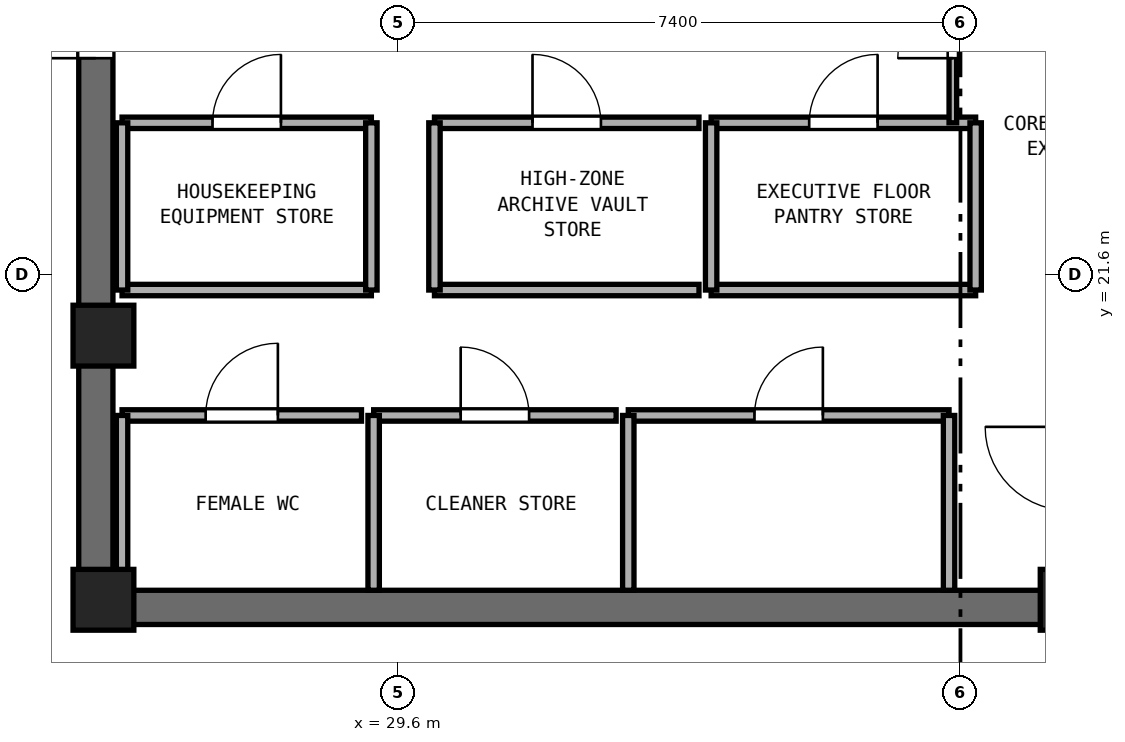
"""IFC4 building model, lengths in metres.
Left out: names, types, materials, properties, quantities, classifications, styles, units other than length and angle.
Written with IfcOpenShell. Run it as: python <this file> out.ifc"""

import sys

from ifc_helpers import new_model, si_unit, direction, frame, frame_2d, origin, origin_2d, place, context, subcontext, project, spatial, rectangle, extrude, element, fill, save


model = new_model("IFC4")
c1 = context("Model", 3, precision=1e-05, world=origin(), true_north=direction((0.0, 1.0)))
c2 = subcontext(c1, "Body", "Model", "MODEL_VIEW")
j1 = project(units=[si_unit("LENGTHUNIT", "METRE"), si_unit("PLANEANGLEUNIT", "RADIAN")], contexts=[c1])
p1 = place(None, origin())
s1 = spatial("IfcSite", under=j1, at=p1, CompositionType="ELEMENT")
p2 = place(p1, origin())
s2 = spatial("IfcBuilding", under=s1, at=p2, CompositionType="ELEMENT")
p3 = place(p2, frame((0.0, 0.0, 289.6)))
s3 = spatial("IfcBuildingStorey", under=s2, at=p3, CompositionType="ELEMENT", Elevation=289.6)
p4 = place(p3, frame((25.4, 17.225, 0.0), z_axis=(0.0, 0.0, 1.0), x_axis=(1.0, 0.0, 0.0)))
e1 = element("IfcWall", 1, at=p4, inside=s3, PredefinedType="SHEAR", context=c2, shape_type="SweptSolid", body=[
    extrude(rectangle(XDim=23.2, YDim=0.45, at=frame_2d((11.6, 0.0))), origin(), (0.0, 0.0, 1.0), 3.54),
])
p5 = place(p3, frame((25.625, 17.45, 0.0), z_axis=(0.0, 0.0, 1.0), x_axis=(0.0, 1.0, 0.0)))
e2 = element("IfcWall", 2, at=p5, inside=s3, PredefinedType="SHEAR", context=c2, shape_type="SweptSolid", body=[
    extrude(rectangle(XDim=15.5, YDim=0.45, at=frame_2d((7.75, 0.0))), origin(), (0.0, 0.0, 1.0), 3.54),
])
p6 = place(p5, frame((7.0, 0.0, 0.0)))
e3 = element("IfcOpeningElement", 3, at=p6, cuts=e2, PredefinedType="OPENING", context=c2, shape_type="SweptSolid", body=[
    extrude(rectangle(XDim=1.5, YDim=2.15, at=frame_2d((0.75, 1.075))), frame((0.0, 0.235, 0.0), z_axis=(0.0, -1.0, 0.0), x_axis=(1.0, 0.0, 0.0)), (0.0, 0.0, 1.0), 0.47),
])
for number, where, z_axis, x_axis in (
    (4, (25.725, 17.325, 0.0), (0.0, 0.0, 1.0), (1.0, 0.0, 0.0)),
    (5, (38.45, 17.325, 0.0), (0.0, 0.0, 1.0), (1.0, 0.0, 0.0)),
    (6, (25.725, 20.8, 0.0), (0.0, 0.0, 1.0), (1.0, 0.0, 0.0)),
):
    element("IfcColumn", number, at=place(p3, frame(where, z_axis=z_axis, x_axis=x_axis)), inside=s3, PredefinedType="PILASTER", context=c2, shape_type="SweptSolid", body=[
        extrude(rectangle(XDim=0.8, YDim=0.8, at=origin_2d()), origin(), (0.0, 0.0, 1.0), 3.8),
    ])
p7 = place(p3, frame((25.97, 19.75, 0.0), z_axis=(0.0, 0.0, 1.0), x_axis=(1.0, 0.0, 0.0)))
e7 = element("IfcWall", 7, at=p7, inside=s3, PredefinedType="PARTITIONING", context=c2, shape_type="SweptSolid", body=[
    extrude(rectangle(XDim=3.15, YDim=0.15, at=frame_2d((1.575, 0.0))), origin(), (0.0, 0.0, 1.0), 3.54),
])
p8 = place(p7, frame((1.1, 0.0, 0.0)))
e8 = element("IfcOpeningElement", 8, at=p8, cuts=e7, PredefinedType="OPENING", context=c2, shape_type="SweptSolid", body=[
    extrude(rectangle(XDim=0.95, YDim=2.1, at=frame_2d((0.475, 1.05))), frame((0.0, 0.085, 0.0), z_axis=(0.0, -1.0, 0.0), x_axis=(1.0, 0.0, 0.0)), (0.0, 0.0, 1.0), 0.17),
])
p9 = place(p3, frame((25.97, 17.45, 0.0), z_axis=(0.0, 0.0, 1.0), x_axis=(0.0, 1.0, 0.0)))
e9 = element("IfcWall", 9, at=p9, inside=s3, PredefinedType="PARTITIONING", context=c2, shape_type="SweptSolid", body=[
    extrude(rectangle(XDim=2.3, YDim=0.15, at=frame_2d((1.15, 0.0))), origin(), (0.0, 0.0, 1.0), 2.64),
])
p10 = place(p3, frame((29.28, 19.75, 0.0), z_axis=(0.0, 0.0, 1.0), x_axis=(1.0, 0.0, 0.0)))
e10 = element("IfcWall", 10, at=p10, inside=s3, PredefinedType="PARTITIONING", context=c2, shape_type="SweptSolid", body=[
    extrude(rectangle(XDim=3.19, YDim=0.15, at=frame_2d((1.595, 0.0))), origin(), (0.0, 0.0, 1.0), 3.54),
])
p11 = place(p10, frame((1.145, 0.0, 0.0)))
e11 = element("IfcOpeningElement", 11, at=p11, cuts=e10, PredefinedType="OPENING", context=c2, shape_type="SweptSolid", body=[
    extrude(rectangle(XDim=0.9, YDim=2.1, at=frame_2d((0.45, 1.05))), frame((0.0, 0.085, 0.0), z_axis=(0.0, -1.0, 0.0), x_axis=(1.0, 0.0, 0.0)), (0.0, 0.0, 1.0), 0.17),
])
p12 = place(p3, frame((29.28, 17.45, 0.0), z_axis=(0.0, 0.0, 1.0), x_axis=(0.0, 1.0, 0.0)))
e12 = element("IfcWall", 12, at=p12, inside=s3, PredefinedType="PARTITIONING", context=c2, shape_type="SweptSolid", body=[
    extrude(rectangle(XDim=2.3, YDim=0.15, at=frame_2d((1.15, 0.0))), origin(), (0.0, 0.0, 1.0), 3.54),
])
p13 = place(p3, frame((32.63, 19.75, 0.0), z_axis=(0.0, 0.0, 1.0), x_axis=(1.0, 0.0, 0.0)))
e13 = element("IfcWall", 13, at=p13, inside=s3, PredefinedType="PARTITIONING", context=c2, shape_type="SweptSolid", body=[
    extrude(rectangle(XDim=4.22, YDim=0.15, at=frame_2d((2.11, 0.0))), origin(), (0.0, 0.0, 1.0), 3.54),
])
p14 = place(p13, frame((1.66, 0.0, 0.0)))
e14 = element("IfcOpeningElement", 14, at=p14, cuts=e13, PredefinedType="OPENING", context=c2, shape_type="SweptSolid", body=[
    extrude(rectangle(XDim=0.9, YDim=2.1, at=frame_2d((0.45, 1.05))), frame((0.0, 0.085, 0.0), z_axis=(0.0, -1.0, 0.0), x_axis=(1.0, 0.0, 0.0)), (0.0, 0.0, 1.0), 0.17),
])
for number, where, z_axis, x_axis in (
    (15, (32.63, 17.45, 0.0), (0.0, 0.0, 1.0), (0.0, 1.0, 0.0)),
    (16, (36.85, 17.45, 0.0), (0.0, 0.0, 1.0), (0.0, 1.0, 0.0)),
):
    element("IfcWall", number, at=place(p3, frame(where, z_axis=z_axis, x_axis=x_axis)), inside=s3, PredefinedType="PARTITIONING", context=c2, shape_type="SweptSolid", body=[
        extrude(rectangle(XDim=2.3, YDim=0.15, at=frame_2d((1.15, 0.0))), origin(), (0.0, 0.0, 1.0), 3.54),
    ])
p15 = place(p3, frame((25.97, 21.4, 0.0), z_axis=(0.0, 0.0, 1.0), x_axis=(1.0, 0.0, 0.0)))
e17 = element("IfcWall", 17, at=p15, inside=s3, PredefinedType="PARTITIONING", context=c2, shape_type="SweptSolid", body=[
    extrude(rectangle(XDim=3.28, YDim=0.15, at=frame_2d((1.64, 0.0))), origin(), (0.0, 0.0, 1.0), 3.54),
])
p16 = place(p3, frame((25.97, 23.6, 0.0), z_axis=(0.0, 0.0, 1.0), x_axis=(1.0, 0.0, 0.0)))
e18 = element("IfcWall", 18, at=p16, inside=s3, PredefinedType="PARTITIONING", context=c2, shape_type="SweptSolid", body=[
    extrude(rectangle(XDim=3.28, YDim=0.15, at=frame_2d((1.64, 0.0))), origin(), (0.0, 0.0, 1.0), 3.54),
])
p17 = place(p16, frame((1.19, 0.0, 0.0)))
e19 = element("IfcOpeningElement", 19, at=p17, cuts=e18, PredefinedType="OPENING", context=c2, shape_type="SweptSolid", body=[
    extrude(rectangle(XDim=0.9, YDim=2.1, at=frame_2d((0.45, 1.05))), frame((0.0, 0.085, 0.0), z_axis=(0.0, -1.0, 0.0), x_axis=(1.0, 0.0, 0.0)), (0.0, 0.0, 1.0), 0.17),
])
p18 = place(p3, frame((25.97, 21.4, 0.0), z_axis=(0.0, 0.0, 1.0), x_axis=(0.0, 1.0, 0.0)))
e20 = element("IfcWall", 20, at=p18, inside=s3, PredefinedType="PARTITIONING", context=c2, shape_type="SweptSolid", body=[
    extrude(rectangle(XDim=2.2, YDim=0.15, at=frame_2d((1.1, 0.0))), origin(), (0.0, 0.0, 1.0), 2.64),
])
p19 = place(p3, frame((29.25, 21.4, 0.0), z_axis=(0.0, 0.0, 1.0), x_axis=(0.0, 1.0, 0.0)))
e21 = element("IfcWall", 21, at=p19, inside=s3, PredefinedType="PARTITIONING", context=c2, shape_type="SweptSolid", body=[
    extrude(rectangle(XDim=2.2, YDim=0.15, at=frame_2d((1.1, 0.0))), origin(), (0.0, 0.0, 1.0), 3.54),
])
p20 = place(p3, frame((30.08, 21.4, 0.0), z_axis=(0.0, 0.0, 1.0), x_axis=(1.0, 0.0, 0.0)))
e22 = element("IfcWall", 22, at=p20, inside=s3, PredefinedType="PARTITIONING", context=c2, shape_type="SweptSolid", body=[
    extrude(rectangle(XDim=3.48, YDim=0.15, at=frame_2d((1.74, 0.0))), origin(), (0.0, 0.0, 1.0), 3.54),
])
p21 = place(p3, frame((30.08, 23.6, 0.0), z_axis=(0.0, 0.0, 1.0), x_axis=(1.0, 0.0, 0.0)))
e23 = element("IfcWall", 23, at=p21, inside=s3, PredefinedType="PARTITIONING", context=c2, shape_type="SweptSolid", body=[
    extrude(rectangle(XDim=3.48, YDim=0.15, at=frame_2d((1.74, 0.0))), origin(), (0.0, 0.0, 1.0), 3.54),
])
p22 = place(p21, frame((1.29, 0.0, 0.0)))
e24 = element("IfcOpeningElement", 24, at=p22, cuts=e23, PredefinedType="OPENING", context=c2, shape_type="SweptSolid", body=[
    extrude(rectangle(XDim=0.9, YDim=2.1, at=frame_2d((0.45, 1.05))), frame((0.0, 0.085, 0.0), z_axis=(0.0, -1.0, 0.0), x_axis=(1.0, 0.0, 0.0)), (0.0, 0.0, 1.0), 0.17),
])
p23 = place(p3, frame((30.08, 21.4, 0.0), z_axis=(0.0, 0.0, 1.0), x_axis=(0.0, 1.0, 0.0)))
e25 = element("IfcWall", 25, at=p23, inside=s3, PredefinedType="PARTITIONING", context=c2, shape_type="SweptSolid", body=[
    extrude(rectangle(XDim=2.2, YDim=0.15, at=frame_2d((1.1, 0.0))), origin(), (0.0, 0.0, 1.0), 3.54),
])
p24 = place(p3, frame((33.72, 21.4, 0.0), z_axis=(0.0, 0.0, 1.0), x_axis=(1.0, 0.0, 0.0)))
e26 = element("IfcWall", 26, at=p24, inside=s3, PredefinedType="PARTITIONING", context=c2, shape_type="SweptSolid", body=[
    extrude(rectangle(XDim=3.48, YDim=0.15, at=frame_2d((1.74, 0.0))), origin(), (0.0, 0.0, 1.0), 3.54),
])
p25 = place(p3, frame((33.72, 23.6, 0.0), z_axis=(0.0, 0.0, 1.0), x_axis=(1.0, 0.0, 0.0)))
e27 = element("IfcWall", 27, at=p25, inside=s3, PredefinedType="PARTITIONING", context=c2, shape_type="SweptSolid", body=[
    extrude(rectangle(XDim=3.48, YDim=0.15, at=frame_2d((1.74, 0.0))), origin(), (0.0, 0.0, 1.0), 3.54),
])
p26 = place(p25, frame((1.29, 0.0, 0.0)))
e28 = element("IfcOpeningElement", 28, at=p26, cuts=e27, PredefinedType="OPENING", context=c2, shape_type="SweptSolid", body=[
    extrude(rectangle(XDim=0.9, YDim=2.1, at=frame_2d((0.45, 1.05))), frame((0.0, 0.085, 0.0), z_axis=(0.0, -1.0, 0.0), x_axis=(1.0, 0.0, 0.0)), (0.0, 0.0, 1.0), 0.17),
])
for number, where, z_axis, x_axis in (
    (29, (33.72, 21.4, 0.0), (0.0, 0.0, 1.0), (0.0, 1.0, 0.0)),
    (30, (37.2, 21.4, 0.0), (0.0, 0.0, 1.0), (0.0, 1.0, 0.0)),
):
    element("IfcWall", number, at=place(p3, frame(where, z_axis=z_axis, x_axis=x_axis)), inside=s3, PredefinedType="PARTITIONING", context=c2, shape_type="SweptSolid", body=[
        extrude(rectangle(XDim=2.2, YDim=0.15, at=frame_2d((1.1, 0.0))), origin(), (0.0, 0.0, 1.0), 3.54),
    ])
p27 = place(p3, frame((36.9, 23.6, 0.0), z_axis=(0.0, 0.0, 1.0), x_axis=(0.0, 1.0, 0.0)))
e31 = element("IfcWall", 31, at=p27, inside=s3, PredefinedType="PARTITIONING", context=c2, shape_type="SweptSolid", body=[
    extrude(rectangle(XDim=3.2, YDim=0.1, at=frame_2d((1.6, 0.0))), origin(), (0.0, 0.0, 1.0), 3.54),
])
p28 = place(p27, frame((0.85, 0.0, 0.0)))
e32 = element("IfcOpeningElement", 32, at=p28, cuts=e31, PredefinedType="OPENING", context=c2, shape_type="SweptSolid", body=[
    extrude(rectangle(XDim=1.45, YDim=2.12, at=frame_2d((0.725, 1.06))), frame((0.0, 0.06, 0.0), z_axis=(0.0, -1.0, 0.0), x_axis=(1.0, 0.0, 0.0)), (0.0, 0.0, 1.0), 0.12),
])
p29 = place(p6, origin())
e33 = element("IfcDoor", 33, at=p29, inside=s3, OperationType="DOUBLE_DOOR_SINGLE_SWING", PredefinedType="DOOR", context=c2, shape_type="SweptSolid", body=[
    extrude(rectangle(XDim=1.5, YDim=2.15, at=frame_2d((0.75, 1.075))), frame((0.0, 0.025, 0.0), z_axis=(0.0, -1.0, 0.0), x_axis=(1.0, 0.0, 0.0)), (0.0, 0.0, 1.0), 0.05),
])
fill(e3, e33)
p30 = place(p8, origin())
e34 = element("IfcDoor", 34, at=p30, inside=s3, OperationType="SINGLE_SWING_RIGHT", PredefinedType="DOOR", context=c2, shape_type="SweptSolid", body=[
    extrude(rectangle(XDim=0.95, YDim=2.1, at=frame_2d((0.475, 1.05))), frame((0.0, 0.025, 0.0), z_axis=(0.0, -1.0, 0.0), x_axis=(1.0, 0.0, 0.0)), (0.0, 0.0, 1.0), 0.05),
])
fill(e8, e34)
p31 = place(p11, origin())
e35 = element("IfcDoor", 35, at=p31, inside=s3, OperationType="SINGLE_SWING_LEFT", PredefinedType="DOOR", context=c2, shape_type="SweptSolid", body=[
    extrude(rectangle(XDim=0.9, YDim=2.1, at=frame_2d((0.45, 1.05))), frame((0.0, 0.025, 0.0), z_axis=(0.0, -1.0, 0.0), x_axis=(1.0, 0.0, 0.0)), (0.0, 0.0, 1.0), 0.05),
])
fill(e11, e35)
p32 = place(p14, origin())
e36 = element("IfcDoor", 36, at=p32, inside=s3, OperationType="SINGLE_SWING_RIGHT", PredefinedType="DOOR", context=c2, shape_type="SweptSolid", body=[
    extrude(rectangle(XDim=0.9, YDim=2.1, at=frame_2d((0.45, 1.05))), frame((0.0, 0.025, 0.0), z_axis=(0.0, -1.0, 0.0), x_axis=(1.0, 0.0, 0.0)), (0.0, 0.0, 1.0), 0.05),
])
fill(e14, e36)
p33 = place(p17, origin())
e37 = element("IfcDoor", 37, at=p33, inside=s3, OperationType="SINGLE_SWING_RIGHT", PredefinedType="DOOR", context=c2, shape_type="SweptSolid", body=[
    extrude(rectangle(XDim=0.9, YDim=2.1, at=frame_2d((0.45, 1.05))), frame((0.0, 0.025, 0.0), z_axis=(0.0, -1.0, 0.0), x_axis=(1.0, 0.0, 0.0)), (0.0, 0.0, 1.0), 0.05),
])
fill(e19, e37)
p34 = place(p22, origin())
e38 = element("IfcDoor", 38, at=p34, inside=s3, OperationType="SINGLE_SWING_LEFT", PredefinedType="DOOR", context=c2, shape_type="SweptSolid", body=[
    extrude(rectangle(XDim=0.9, YDim=2.1, at=frame_2d((0.45, 1.05))), frame((0.0, 0.025, 0.0), z_axis=(0.0, -1.0, 0.0), x_axis=(1.0, 0.0, 0.0)), (0.0, 0.0, 1.0), 0.05),
])
fill(e24, e38)
p35 = place(p26, origin())
e39 = element("IfcDoor", 39, at=p35, inside=s3, OperationType="SINGLE_SWING_RIGHT", PredefinedType="DOOR", context=c2, shape_type="SweptSolid", body=[
    extrude(rectangle(XDim=0.9, YDim=2.1, at=frame_2d((0.45, 1.05))), frame((0.0, 0.025, 0.0), z_axis=(0.0, -1.0, 0.0), x_axis=(1.0, 0.0, 0.0)), (0.0, 0.0, 1.0), 0.05),
])
fill(e28, e39)
p36 = place(p28, origin())
e40 = element("IfcDoor", 40, at=p36, inside=s3, OperationType="DOUBLE_DOOR_SINGLE_SWING", PredefinedType="DOOR", context=c2, shape_type="SweptSolid", body=[
    extrude(rectangle(XDim=1.45, YDim=2.12, at=frame_2d((0.725, 1.06))), frame((0.0, 0.025, 0.0), z_axis=(0.0, -1.0, 0.0), x_axis=(1.0, 0.0, 0.0)), (0.0, 0.0, 1.0), 0.05),
])
fill(e32, e40)
save(model, sys.argv[1])
